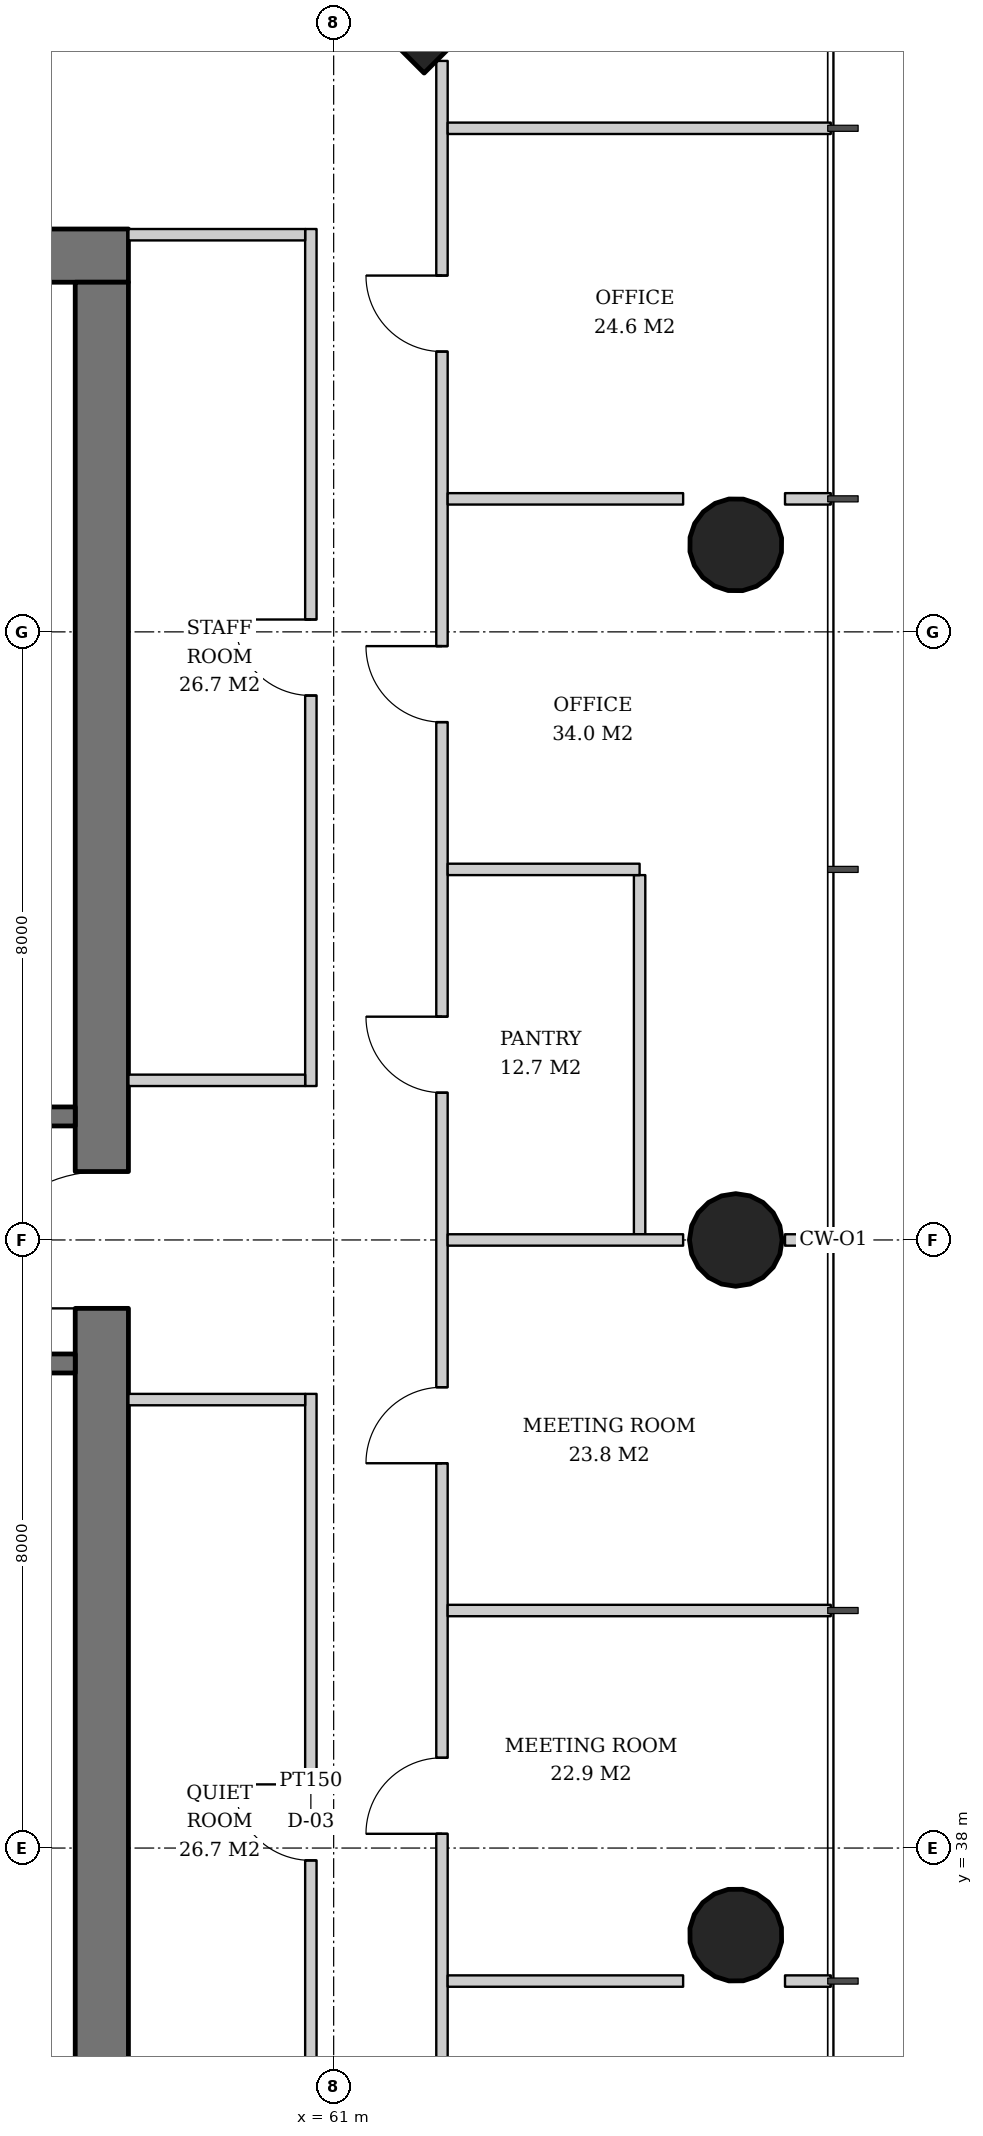
"""IFC4 building model, lengths in metres.
Left out: names, types, materials, properties, quantities, classifications, styles, units other than length and angle.
Written with IfcOpenShell. Run it as: python <this file> out.ifc"""

import sys

from ifc_helpers import new_model, si_unit, direction, frame, frame_2d, origin, origin_2d, place, context, subcontext, project, spatial, rectangle, hollow_circle, extrude, element, fill, save


model = new_model("IFC4")
c1 = context("Model", 3, precision=1e-05, world=origin(), true_north=direction((0.0, 1.0)))
c2 = subcontext(c1, "Body", "Model", "MODEL_VIEW")
j1 = project(units=[si_unit("LENGTHUNIT", "METRE"), si_unit("PLANEANGLEUNIT", "RADIAN")], contexts=[c1])
p1 = place(None, origin())
s1 = spatial("IfcSite", under=j1, at=p1, CompositionType="ELEMENT")
p2 = place(p1, origin())
s2 = spatial("IfcBuilding", under=s1, at=p2, CompositionType="ELEMENT")
p3 = place(p2, frame((0.0, 0.0, 104.6)))
s3 = spatial("IfcBuildingStorey", under=s2, at=p3, CompositionType="ELEMENT", Elevation=104.6)
p4 = place(p3, frame((62.229, 63.229, 0.0), z_axis=(-0.031900153262, -0.031900153262, 0.998981861919), x_axis=(0.707106781187, -0.707106781187, 0.0)))
e1 = element("IfcColumn", 1, at=p4, inside=s3, PredefinedType="COLUMN", context=c2, shape_type="SweptSolid", body=[
    extrude(rectangle(XDim=2.6, YDim=2.6, at=origin_2d()), origin(), (0.0, 0.0, 1.0), 3.804),
])
p5 = place(p3, frame((66.329, 36.836, 0.0), z_axis=(-0.031976461511, 0.015988230756, 0.999360736865), x_axis=(-0.4472135955, -0.894427191, 0.0)))
e2 = element("IfcColumn", 2, at=p5, inside=s3, PredefinedType="COLUMN", context=c2, shape_type="SweptSolid", body=[
    extrude(hollow_circle(Radius=0.61, WallThickness=0.04, at=origin_2d()), origin(), (0.0, 0.0, 1.0), 3.802),
])
p6 = place(p3, frame((66.329, 46.0, 0.0), z_axis=(-0.031980549263, 0.0, 0.999488491414), x_axis=(0.0, -1.0, 0.0)))
e3 = element("IfcColumn", 3, at=p6, inside=s3, PredefinedType="COLUMN", context=c2, shape_type="SweptSolid", body=[
    extrude(hollow_circle(Radius=0.61, WallThickness=0.04, at=origin_2d()), origin(), (0.0, 0.0, 1.0), 3.802),
])
p7 = place(p3, frame((66.329, 55.164, 0.0), z_axis=(-0.031976461511, -0.015988230756, 0.999360736865), x_axis=(0.4472135955, -0.894427191, 0.0)))
e4 = element("IfcColumn", 4, at=p7, inside=s3, PredefinedType="COLUMN", context=c2, shape_type="SweptSolid", body=[
    extrude(hollow_circle(Radius=0.61, WallThickness=0.04, at=origin_2d()), origin(), (0.0, 0.0, 1.0), 3.802),
])
p8 = place(p3, frame((31.7, 58.95, 0.0), z_axis=(0.0, 0.0, 1.0), x_axis=(1.0, 0.0, 0.0)))
e5 = element("IfcWall", 5, at=p8, inside=s3, PredefinedType="SHEAR", context=c2, shape_type="SweptSolid", body=[
    extrude(rectangle(XDim=26.6, YDim=0.7, at=frame_2d((13.3, 0.0))), origin(), (0.0, 0.0, 1.0), 3.8),
])
p9 = place(p8, frame((17.94, 0.0, 0.0)))
e6 = element("IfcOpeningElement", 6, at=p9, cuts=e5, PredefinedType="OPENING", context=c2, shape_type="SweptSolid", body=[
    extrude(rectangle(XDim=1.0, YDim=2.1, at=frame_2d((0.5, 1.05))), frame((0.0, 0.36, 0.0), z_axis=(0.0, -1.0, 0.0), x_axis=(1.0, 0.0, 0.0)), (0.0, 0.0, 1.0), 0.72),
])
p10 = place(p8, frame((5.825, 0.0, 0.0)))
e7 = element("IfcOpeningElement", 7, at=p10, cuts=e5, PredefinedType="OPENING", context=c2, shape_type="SweptSolid", body=[
    extrude(rectangle(XDim=1.0, YDim=2.1, at=frame_2d((0.5, 1.05))), frame((0.0, 0.36, 0.0), z_axis=(0.0, -1.0, 0.0), x_axis=(1.0, 0.0, 0.0)), (0.0, 0.0, 1.0), 0.72),
])
p11 = place(p8, frame((0.978, 0.0, 0.0)))
e8 = element("IfcOpeningElement", 8, at=p11, cuts=e5, PredefinedType="OPENING", context=c2, shape_type="SweptSolid", body=[
    extrude(rectangle(XDim=1.0, YDim=2.1, at=frame_2d((0.5, 1.05))), frame((0.0, 0.36, 0.0), z_axis=(0.0, -1.0, 0.0), x_axis=(1.0, 0.0, 0.0)), (0.0, 0.0, 1.0), 0.72),
])
p12 = place(p8, frame((2.587, 0.0, 0.0)))
e9 = element("IfcOpeningElement", 9, at=p12, cuts=e5, PredefinedType="OPENING", context=c2, shape_type="SweptSolid", body=[
    extrude(rectangle(XDim=1.0, YDim=2.1, at=frame_2d((0.5, 1.05))), frame((0.0, 0.36, 0.0), z_axis=(0.0, -1.0, 0.0), x_axis=(1.0, 0.0, 0.0)), (0.0, 0.0, 1.0), 0.72),
])
p13 = place(p8, frame((4.211, 0.0, 0.0)))
e10 = element("IfcOpeningElement", 10, at=p13, cuts=e5, PredefinedType="OPENING", context=c2, shape_type="SweptSolid", body=[
    extrude(rectangle(XDim=1.0, YDim=2.1, at=frame_2d((0.5, 1.05))), frame((0.0, 0.36, 0.0), z_axis=(0.0, -1.0, 0.0), x_axis=(1.0, 0.0, 0.0)), (0.0, 0.0, 1.0), 0.72),
])
p14 = place(p8, frame((9.126, 0.0, 0.0)))
e11 = element("IfcOpeningElement", 11, at=p14, cuts=e5, PredefinedType="OPENING", context=c2, shape_type="SweptSolid", body=[
    extrude(rectangle(XDim=1.0, YDim=2.1, at=frame_2d((0.5, 1.05))), frame((0.0, 0.36, 0.0), z_axis=(0.0, -1.0, 0.0), x_axis=(1.0, 0.0, 0.0)), (0.0, 0.0, 1.0), 0.72),
])
p15 = place(p8, frame((14.029, 0.0, 0.0)))
e12 = element("IfcOpeningElement", 12, at=p15, cuts=e5, PredefinedType="OPENING", context=c2, shape_type="SweptSolid", body=[
    extrude(rectangle(XDim=1.0, YDim=2.1, at=frame_2d((0.5, 1.05))), frame((0.0, 0.36, 0.0), z_axis=(0.0, -1.0, 0.0), x_axis=(1.0, 0.0, 0.0)), (0.0, 0.0, 1.0), 0.72),
])
p16 = place(p8, frame((22.4, 0.0, 0.0)))
e13 = element("IfcOpeningElement", 13, at=p16, cuts=e5, PredefinedType="OPENING", context=c2, shape_type="SweptSolid", body=[
    extrude(rectangle(XDim=1.0, YDim=2.1, at=frame_2d((0.5, 1.05))), frame((0.0, 0.36, 0.0), z_axis=(0.0, -1.0, 0.0), x_axis=(1.0, 0.0, 0.0)), (0.0, 0.0, 1.0), 0.72),
])
p17 = place(p3, frame((57.95, 33.4, 0.0), z_axis=(0.0, 0.0, 1.0), x_axis=(0.0, 1.0, 0.0)))
e14 = element("IfcWall", 14, at=p17, inside=s3, PredefinedType="SHEAR", context=c2, shape_type="SweptSolid", body=[
    extrude(rectangle(XDim=25.2, YDim=0.7, at=frame_2d((12.6, 0.0))), origin(), (0.0, 0.0, 1.0), 3.8),
])
p18 = place(p17, frame((11.7, 0.0, 0.0)))
e15 = element("IfcOpeningElement", 15, at=p18, cuts=e14, PredefinedType="OPENING", context=c2, shape_type="SweptSolid", body=[
    extrude(rectangle(XDim=1.8, YDim=2.4, at=frame_2d((0.9, 1.2))), frame((0.0, 0.36, 0.0), z_axis=(0.0, -1.0, 0.0), x_axis=(1.0, 0.0, 0.0)), (0.0, 0.0, 1.0), 0.72),
])
for number, where, z_axis, x_axis in (
    (16, (54.9, 44.375, 0.0), (0.0, 0.0, 1.0), (1.0, 0.0, 0.0)),
    (17, (54.9, 47.625, 0.0), (0.0, 0.0, 1.0), (1.0, 0.0, 0.0)),
):
    element("IfcWall", number, at=place(p3, frame(where, z_axis=z_axis, x_axis=x_axis)), inside=s3, PredefinedType="SOLIDWALL", context=c2, shape_type="SweptSolid", body=[
        extrude(rectangle(XDim=2.7, YDim=0.25, at=frame_2d((1.35, 0.0))), origin(), (0.0, 0.0, 1.0), 3.62),
    ])
p19 = place(p3, frame((60.7, 32.7, 0.0), z_axis=(0.0, 0.0, 1.0), x_axis=(0.0, 1.0, 0.0)))
e18 = element("IfcWall", 18, at=p19, inside=s3, PredefinedType="PARTITIONING", context=c2, shape_type="SweptSolid", body=[
    extrude(rectangle(XDim=11.275, YDim=0.15, at=frame_2d((5.638, 0.0))), origin(), (0.0, 0.0, 1.0), 2.72),
])
p20 = place(p19, frame((5.137, 0.0, 0.0)))
e19 = element("IfcOpeningElement", 19, at=p20, cuts=e18, PredefinedType="OPENING", context=c2, shape_type="SweptSolid", body=[
    extrude(rectangle(XDim=1.0, YDim=2.1, at=frame_2d((0.5, 1.05))), frame((0.0, 0.085, 0.0), z_axis=(0.0, -1.0, 0.0), x_axis=(1.0, 0.0, 0.0)), (0.0, 0.0, 1.0), 0.17),
])
p21 = place(p3, frame((58.3, 43.9, 0.0), z_axis=(0.0, 0.0, 1.0), x_axis=(1.0, 0.0, 0.0)))
e20 = element("IfcWall", 20, at=p21, inside=s3, PredefinedType="PARTITIONING", context=c2, shape_type="SweptSolid", body=[
    extrude(rectangle(XDim=2.325, YDim=0.15, at=frame_2d((1.163, 0.0))), origin(), (0.0, 0.0, 1.0), 3.62),
])
p22 = place(p3, frame((60.7, 48.025, 0.0), z_axis=(0.0, 0.0, 1.0), x_axis=(0.0, 1.0, 0.0)))
e21 = element("IfcWall", 21, at=p22, inside=s3, PredefinedType="PARTITIONING", context=c2, shape_type="SweptSolid", body=[
    extrude(rectangle(XDim=11.275, YDim=0.15, at=frame_2d((5.638, 0.0))), origin(), (0.0, 0.0, 1.0), 2.806),
])
p23 = place(p22, frame((5.137, 0.0, 0.0)))
e22 = element("IfcOpeningElement", 22, at=p23, cuts=e21, PredefinedType="OPENING", context=c2, shape_type="SweptSolid", body=[
    extrude(rectangle(XDim=1.0, YDim=2.1, at=frame_2d((0.5, 1.05))), frame((0.0, 0.085, 0.0), z_axis=(0.0, -1.0, 0.0), x_axis=(1.0, 0.0, 0.0)), (0.0, 0.0, 1.0), 0.17),
])
for number, where, z_axis, x_axis in (
    (23, (58.3, 48.1, 0.0), (0.0, 0.0, 1.0), (1.0, 0.0, 0.0)),
    (24, (58.3, 59.225, 0.0), (0.0, 0.0, 1.0), (1.0, 0.0, 0.0)),
):
    element("IfcWall", number, at=place(p3, frame(where, z_axis=z_axis, x_axis=x_axis)), inside=s3, PredefinedType="PARTITIONING", context=c2, shape_type="SweptSolid", body=[
        extrude(rectangle(XDim=2.325, YDim=0.15, at=frame_2d((1.163, 0.0))), origin(), (0.0, 0.0, 1.0), 3.62),
    ])
p24 = place(p3, frame((65.025, 46.075, 0.0), z_axis=(0.0, 0.0, 1.0), x_axis=(0.0, 1.0, 0.0)))
e25 = element("IfcWall", 25, at=p24, inside=s3, PredefinedType="PARTITIONING", context=c2, shape_type="SweptSolid", body=[
    extrude(rectangle(XDim=4.725, YDim=0.15, at=frame_2d((2.363, 0.0))), origin(), (0.0, 0.0, 1.0), 2.858),
])
p25 = place(p3, frame((62.425, 30.489, 0.0), z_axis=(0.0, 0.0, 1.0), x_axis=(0.0, 1.0, 0.0)))
e26 = element("IfcWall", 26, at=p25, inside=s3, PredefinedType="PARTITIONING", context=c2, shape_type="SweptSolid", body=[
    extrude(rectangle(XDim=31.023, YDim=0.15, at=frame_2d((15.511, 0.0))), origin(), (0.0, 0.0, 1.0), 2.72),
])
p26 = place(p25, frame((2.824, 0.0, 0.0)))
e27 = element("IfcOpeningElement", 27, at=p26, cuts=e26, PredefinedType="OPENING", context=c2, shape_type="SweptSolid", body=[
    extrude(rectangle(XDim=1.0, YDim=2.1, at=frame_2d((0.5, 1.05))), frame((0.0, 0.085, 0.0), z_axis=(0.0, -1.0, 0.0), x_axis=(1.0, 0.0, 0.0)), (0.0, 0.0, 1.0), 0.17),
])
p27 = place(p25, frame((7.699, 0.0, 0.0)))
e28 = element("IfcOpeningElement", 28, at=p27, cuts=e26, PredefinedType="OPENING", context=c2, shape_type="SweptSolid", body=[
    extrude(rectangle(XDim=1.0, YDim=2.1, at=frame_2d((0.5, 1.05))), frame((0.0, 0.085, 0.0), z_axis=(0.0, -1.0, 0.0), x_axis=(1.0, 0.0, 0.0)), (0.0, 0.0, 1.0), 0.17),
])
p28 = place(p25, frame((12.574, 0.0, 0.0)))
e29 = element("IfcOpeningElement", 29, at=p28, cuts=e26, PredefinedType="OPENING", context=c2, shape_type="SweptSolid", body=[
    extrude(rectangle(XDim=1.0, YDim=2.1, at=frame_2d((0.5, 1.05))), frame((0.0, 0.085, 0.0), z_axis=(0.0, -1.0, 0.0), x_axis=(1.0, 0.0, 0.0)), (0.0, 0.0, 1.0), 0.17),
])
p29 = place(p25, frame((17.449, 0.0, 0.0)))
e30 = element("IfcOpeningElement", 30, at=p29, cuts=e26, PredefinedType="OPENING", context=c2, shape_type="SweptSolid", body=[
    extrude(rectangle(XDim=1.0, YDim=2.1, at=frame_2d((0.5, 1.05))), frame((0.0, 0.085, 0.0), z_axis=(0.0, -1.0, 0.0), x_axis=(1.0, 0.0, 0.0)), (0.0, 0.0, 1.0), 0.17),
])
p30 = place(p25, frame((22.324, 0.0, 0.0)))
e31 = element("IfcOpeningElement", 31, at=p30, cuts=e26, PredefinedType="OPENING", context=c2, shape_type="SweptSolid", body=[
    extrude(rectangle(XDim=1.0, YDim=2.1, at=frame_2d((0.5, 1.05))), frame((0.0, 0.085, 0.0), z_axis=(0.0, -1.0, 0.0), x_axis=(1.0, 0.0, 0.0)), (0.0, 0.0, 1.0), 0.17),
])
p31 = place(p25, frame((27.199, 0.0, 0.0)))
e32 = element("IfcOpeningElement", 32, at=p31, cuts=e26, PredefinedType="OPENING", context=c2, shape_type="SweptSolid", body=[
    extrude(rectangle(XDim=1.0, YDim=2.1, at=frame_2d((0.5, 1.05))), frame((0.0, 0.085, 0.0), z_axis=(0.0, -1.0, 0.0), x_axis=(1.0, 0.0, 0.0)), (0.0, 0.0, 1.0), 0.17),
])
p32 = place(p3, frame((62.5, 36.25, 0.0), z_axis=(0.0, 0.0, 1.0), x_axis=(1.0, 0.0, 0.0)))
e33 = element("IfcWall", 33, at=p32, inside=s3, PredefinedType="PARTITIONING", context=c2, shape_type="SweptSolid", body=[
    extrude(rectangle(XDim=3.098, YDim=0.15, at=frame_2d((1.549, 0.0))), origin(), (0.0, 0.0, 1.0), 3.62),
])
p33 = place(p3, frame((66.938, 36.25, 0.0), z_axis=(0.0, 0.0, 1.0), x_axis=(1.0, 0.0, 0.0)))
e34 = element("IfcWall", 34, at=p33, inside=s3, PredefinedType="PARTITIONING", context=c2, shape_type="SweptSolid", body=[
    extrude(rectangle(XDim=0.602, YDim=0.15, at=frame_2d((0.301, 0.0))), origin(), (0.0, 0.0, 1.0), 3.62),
])
p34 = place(p3, frame((62.5, 41.125, 0.0), z_axis=(0.0, 0.0, 1.0), x_axis=(1.0, 0.0, 0.0)))
e35 = element("IfcWall", 35, at=p34, inside=s3, PredefinedType="PARTITIONING", context=c2, shape_type="SweptSolid", body=[
    extrude(rectangle(XDim=5.04, YDim=0.15, at=frame_2d((2.52, 0.0))), origin(), (0.0, 0.0, 1.0), 2.82),
])
p35 = place(p3, frame((62.5, 46.0, 0.0), z_axis=(0.0, 0.0, 1.0), x_axis=(1.0, 0.0, 0.0)))
e36 = element("IfcWall", 36, at=p35, inside=s3, PredefinedType="PARTITIONING", context=c2, shape_type="SweptSolid", body=[
    extrude(rectangle(XDim=3.098, YDim=0.15, at=frame_2d((1.549, 0.0))), origin(), (0.0, 0.0, 1.0), 2.858),
])
p36 = place(p3, frame((66.938, 46.0, 0.0), z_axis=(0.0, 0.0, 1.0), x_axis=(1.0, 0.0, 0.0)))
e37 = element("IfcWall", 37, at=p36, inside=s3, PredefinedType="PARTITIONING", context=c2, shape_type="SweptSolid", body=[
    extrude(rectangle(XDim=0.602, YDim=0.15, at=frame_2d((0.301, 0.0))), origin(), (0.0, 0.0, 1.0), 3.62),
])
p37 = place(p3, frame((62.5, 50.875, 0.0), z_axis=(0.0, 0.0, 1.0), x_axis=(1.0, 0.0, 0.0)))
e38 = element("IfcWall", 38, at=p37, inside=s3, PredefinedType="PARTITIONING", context=c2, shape_type="SweptSolid", body=[
    extrude(rectangle(XDim=2.525, YDim=0.15, at=frame_2d((1.262, 0.0))), origin(), (0.0, 0.0, 1.0), 3.62),
])
p38 = place(p3, frame((62.5, 55.75, 0.0), z_axis=(0.0, 0.0, 1.0), x_axis=(1.0, 0.0, 0.0)))
e39 = element("IfcWall", 39, at=p38, inside=s3, PredefinedType="PARTITIONING", context=c2, shape_type="SweptSolid", body=[
    extrude(rectangle(XDim=3.098, YDim=0.15, at=frame_2d((1.549, 0.0))), origin(), (0.0, 0.0, 1.0), 3.62),
])
p39 = place(p3, frame((66.938, 55.75, 0.0), z_axis=(0.0, 0.0, 1.0), x_axis=(1.0, 0.0, 0.0)))
e40 = element("IfcWall", 40, at=p39, inside=s3, PredefinedType="PARTITIONING", context=c2, shape_type="SweptSolid", body=[
    extrude(rectangle(XDim=0.602, YDim=0.15, at=frame_2d((0.301, 0.0))), origin(), (0.0, 0.0, 1.0), 3.62),
])
p40 = place(p3, frame((62.5, 60.625, 0.0), z_axis=(0.0, 0.0, 1.0), x_axis=(1.0, 0.0, 0.0)))
e41 = element("IfcWall", 41, at=p40, inside=s3, PredefinedType="PARTITIONING", context=c2, shape_type="SweptSolid", body=[
    extrude(rectangle(XDim=5.04, YDim=0.15, at=frame_2d((2.52, 0.0))), origin(), (0.0, 0.0, 1.0), 2.82),
])
p41 = place(p18, origin())
e42 = element("IfcDoor", 42, at=p41, inside=s3, OperationType="DOUBLE_DOOR_SINGLE_SWING", PredefinedType="DOOR", context=c2, shape_type="SweptSolid", body=[
    extrude(rectangle(XDim=1.8, YDim=2.4, at=frame_2d((0.9, 1.2))), frame((0.0, 0.025, 0.0), z_axis=(0.0, -1.0, 0.0), x_axis=(1.0, 0.0, 0.0)), (0.0, 0.0, 1.0), 0.05),
])
fill(e15, e42)
p42 = place(p20, origin())
e43 = element("IfcDoor", 43, at=p42, inside=s3, OperationType="SINGLE_SWING_RIGHT", PredefinedType="DOOR", context=c2, shape_type="SweptSolid", body=[
    extrude(rectangle(XDim=1.0, YDim=2.1, at=frame_2d((0.5, 1.05))), frame((0.0, 0.025, 0.0), z_axis=(0.0, -1.0, 0.0), x_axis=(1.0, 0.0, 0.0)), (0.0, 0.0, 1.0), 0.05),
])
fill(e19, e43)
p43 = place(p23, origin())
e44 = element("IfcDoor", 44, at=p43, inside=s3, OperationType="SINGLE_SWING_RIGHT", PredefinedType="DOOR", context=c2, shape_type="SweptSolid", body=[
    extrude(rectangle(XDim=1.0, YDim=2.1, at=frame_2d((0.5, 1.05))), frame((0.0, 0.025, 0.0), z_axis=(0.0, -1.0, 0.0), x_axis=(1.0, 0.0, 0.0)), (0.0, 0.0, 1.0), 0.05),
])
fill(e22, e44)
p44 = place(p27, origin())
e45 = element("IfcDoor", 45, at=p44, inside=s3, OperationType="SINGLE_SWING_LEFT", PredefinedType="DOOR", context=c2, shape_type="SweptSolid", body=[
    extrude(rectangle(XDim=1.0, YDim=2.1, at=frame_2d((0.5, 1.05))), frame((0.0, 0.025, 0.0), z_axis=(0.0, -1.0, 0.0), x_axis=(1.0, 0.0, 0.0)), (0.0, 0.0, 1.0), 0.05),
])
fill(e28, e45)
p45 = place(p28, origin())
e46 = element("IfcDoor", 46, at=p45, inside=s3, OperationType="SINGLE_SWING_LEFT", PredefinedType="DOOR", context=c2, shape_type="SweptSolid", body=[
    extrude(rectangle(XDim=1.0, YDim=2.1, at=frame_2d((0.5, 1.05))), frame((0.0, 0.025, 0.0), z_axis=(0.0, -1.0, 0.0), x_axis=(1.0, 0.0, 0.0)), (0.0, 0.0, 1.0), 0.05),
])
fill(e29, e46)
p46 = place(p29, origin())
e47 = element("IfcDoor", 47, at=p46, inside=s3, OperationType="SINGLE_SWING_RIGHT", PredefinedType="DOOR", context=c2, shape_type="SweptSolid", body=[
    extrude(rectangle(XDim=1.0, YDim=2.1, at=frame_2d((0.5, 1.05))), frame((0.0, 0.025, 0.0), z_axis=(0.0, -1.0, 0.0), x_axis=(1.0, 0.0, 0.0)), (0.0, 0.0, 1.0), 0.05),
])
fill(e30, e47)
p47 = place(p30, origin())
e48 = element("IfcDoor", 48, at=p47, inside=s3, OperationType="SINGLE_SWING_RIGHT", PredefinedType="DOOR", context=c2, shape_type="SweptSolid", body=[
    extrude(rectangle(XDim=1.0, YDim=2.1, at=frame_2d((0.5, 1.05))), frame((0.0, 0.025, 0.0), z_axis=(0.0, -1.0, 0.0), x_axis=(1.0, 0.0, 0.0)), (0.0, 0.0, 1.0), 0.05),
])
fill(e31, e48)
p48 = place(p31, origin())
e49 = element("IfcDoor", 49, at=p48, inside=s3, OperationType="SINGLE_SWING_RIGHT", PredefinedType="DOOR", context=c2, shape_type="SweptSolid", body=[
    extrude(rectangle(XDim=1.0, YDim=2.1, at=frame_2d((0.5, 1.05))), frame((0.0, 0.025, 0.0), z_axis=(0.0, -1.0, 0.0), x_axis=(1.0, 0.0, 0.0)), (0.0, 0.0, 1.0), 0.05),
])
fill(e32, e49)
save(model, sys.argv[1])
